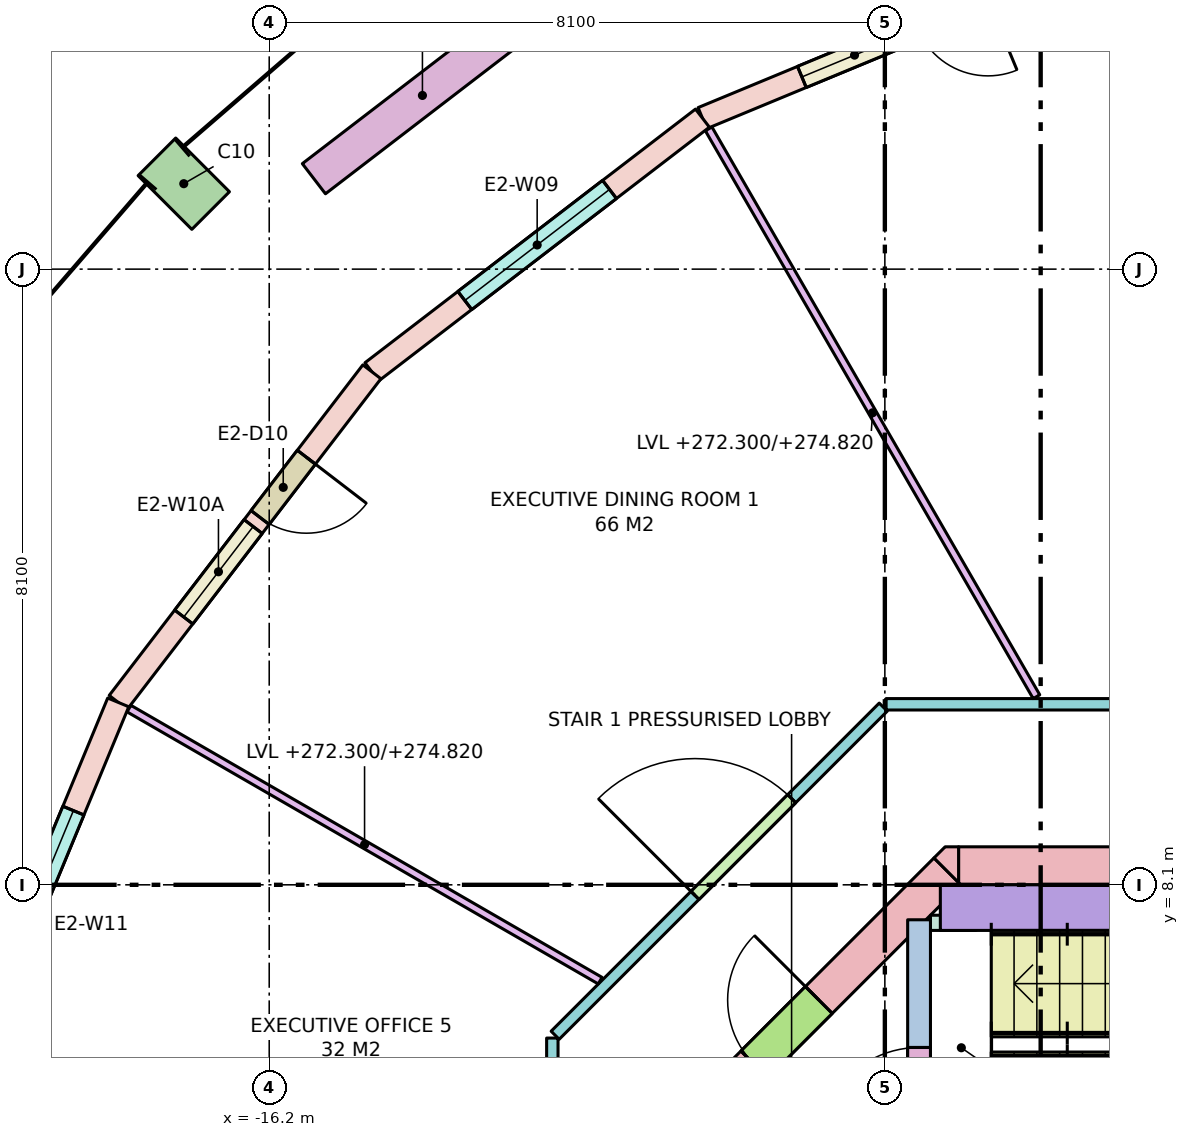
"""IFC4 building model, lengths in metres.
Left out: names, types, materials, properties, quantities, classifications, styles, units other than length and angle.
Written with IfcOpenShell. Run it as: python <this file> out.ifc"""

import sys

from ifc_helpers import new_model, si_unit, direction, frame, frame_2d, origin, origin_2d, place, context, subcontext, project, spatial, polyline, rectangle, outline, extrude, element, fill, save


model = new_model("IFC4")
c1 = context("Model", 3, precision=1e-05, world=origin(), true_north=direction((0.0, 1.0)))
c2 = subcontext(c1, "Body", "Model", "MODEL_VIEW")
j1 = project(units=[si_unit("LENGTHUNIT", "METRE"), si_unit("PLANEANGLEUNIT", "RADIAN")], contexts=[c1])
p1 = place(None, origin())
s1 = spatial("IfcSite", under=j1, at=p1, CompositionType="ELEMENT")
p2 = place(p1, origin())
s2 = spatial("IfcBuilding", under=s1, at=p2, CompositionType="ELEMENT")
p3 = place(p2, frame((0.0, 0.0, 272.3)))
s3 = spatial("IfcBuildingStorey", under=s2, at=p3, CompositionType="ELEMENT", Elevation=272.3)
p4 = place(p3, frame((-17.324, 17.324, 0.0), z_axis=(0.0, 0.0, 1.0), x_axis=(-0.707106781187, -0.707106781187, 0.0)))
e1 = element("IfcColumn", 1, at=p4, inside=s3, PredefinedType="COLUMN", context=c2, shape_type="SweptSolid", body=[
    extrude(rectangle(XDim=0.7, YDim=1.0, at=origin_2d()), origin(), (0.0, 0.0, 1.0), 3.7),
])
p5 = place(p3, frame((-7.13, 8.35, -0.28), z_axis=(0.0, 0.0, 1.0), x_axis=(1.0, 0.0, 0.0)))
e2 = element("IfcWall", 2, at=p5, inside=s3, PredefinedType="SHEAR", context=c2, shape_type="SweptSolid", body=[
    extrude(rectangle(XDim=14.26, YDim=0.5, at=frame_2d((7.13, 0.0))), origin(), (0.0, 0.0, 1.0), 3.7),
])
p6 = place(p5, frame((5.48, 0.0, 0.28)))
e3 = element("IfcOpeningElement", 3, at=p6, cuts=e2, PredefinedType="OPENING", context=c2, shape_type="SweptSolid", body=[
    extrude(rectangle(XDim=0.7, YDim=2.1, at=frame_2d((0.35, 1.05))), frame((0.0, 0.26, 0.0), z_axis=(0.0, -1.0, 0.0), x_axis=(1.0, 0.0, 0.0)), (0.0, 0.0, 1.0), 0.52),
])
p7 = place(p5, frame((7.155, 0.0, 0.28)))
e4 = element("IfcOpeningElement", 4, at=p7, cuts=e2, PredefinedType="OPENING", context=c2, shape_type="SweptSolid", body=[
    extrude(rectangle(XDim=0.9, YDim=2.1, at=frame_2d((0.45, 1.05))), frame((0.0, 0.26, 0.0), z_axis=(0.0, -1.0, 0.0), x_axis=(1.0, 0.0, 0.0)), (0.0, 0.0, 1.0), 0.52),
])
p8 = place(p3, frame((-10.277, 5.277, -0.28), z_axis=(0.0, 0.0, 1.0), x_axis=(0.707106781187, 0.707106781187, 0.0)))
e5 = element("IfcWall", 5, at=p8, inside=s3, PredefinedType="SHEAR", context=c2, shape_type="SweptSolid", body=[
    extrude(rectangle(XDim=4.243, YDim=0.5, at=frame_2d((2.121, 0.0))), origin(), (0.0, 0.0, 1.0), 3.7),
])
p9 = place(p8, frame((0.65, 0.0, 0.28)))
e6 = element("IfcOpeningElement", 6, at=p9, cuts=e5, PredefinedType="OPENING", context=c2, shape_type="SweptSolid", body=[
    extrude(rectangle(XDim=1.2, YDim=2.1, at=frame_2d((0.6, 1.05))), frame((0.0, 0.26, 0.0), z_axis=(0.0, -1.0, 0.0), x_axis=(1.0, 0.0, 0.0)), (0.0, 0.0, 1.0), 0.52),
])
p10 = place(p3, frame((0.0, 0.0, -0.28)))
e7 = element("IfcWall", 7, at=p10, inside=s3, PredefinedType="SHEAR", context=c2, shape_type="SweptSolid", body=[
    extrude(outline(polyline([(-7.307, 8.6), (-7.13, 8.6), (-7.13, 8.13), (-7.454, 8.454), (-7.307, 8.6)])), origin(), (0.0, 0.0, 1.0), 3.7),
])
p11 = place(p3, frame((-7.65, 4.5, 0.0), z_axis=(0.0, 0.0, 1.0), x_axis=(0.0, 1.0, 0.0)))
e8 = element("IfcWall", 8, at=p11, inside=s3, PredefinedType="SHEAR", context=c2, shape_type="SweptSolid", body=[
    extrude(rectangle(XDim=3.14, YDim=0.3, at=frame_2d((1.57, 0.0))), origin(), (0.0, 0.0, 1.0), 3.42),
])
p12 = place(p11, frame((0.14, 0.0, 0.0)))
e9 = element("IfcOpeningElement", 9, at=p12, cuts=e8, PredefinedType="OPENING", context=c2, shape_type="SweptSolid", body=[
    extrude(rectangle(XDim=1.32, YDim=2.1, at=frame_2d((0.66, 1.05))), frame((0.0, 0.16, 0.0), z_axis=(0.0, -1.0, 0.0), x_axis=(1.0, 0.0, 0.0)), (0.0, 0.0, 1.0), 0.32),
])
p13 = place(p3, frame((-7.37, 7.8, 0.0), z_axis=(0.0, 0.0, 1.0), x_axis=(1.0, 0.0, 0.0)))
e10 = element("IfcWall", 10, at=p13, inside=s3, PredefinedType="SHEAR", context=c2, shape_type="SweptSolid", body=[
    extrude(rectangle(XDim=5.37, YDim=0.6, at=frame_2d((2.685, 0.0))), origin(), (0.0, 0.0, 1.0), 3.42),
])
p14 = place(p3, frame((-7.5, 7.6, 0.0), z_axis=(0.0, 0.0, 1.0), x_axis=(1.0, 0.0, 0.0)))
e11 = element("IfcWall", 11, at=p14, inside=s3, PredefinedType="SHEAR", context=c2, shape_type="SweptSolid", body=[
    extrude(rectangle(XDim=0.6, YDim=0.2, at=frame_2d((0.3, 0.0))), origin(), (0.0, 0.0, 1.0), 3.42),
])
p15 = place(p3, frame((-5.435, 20.284, 0.0), z_axis=(0.0, 0.0, 1.0), x_axis=(-0.923877333662, -0.382688740813, 0.0)))
e12 = element("IfcWall", 12, at=p15, inside=s3, PredefinedType="STANDARD", context=c2, shape_type="SweptSolid", body=[
    extrude(rectangle(XDim=5.482, YDim=0.3, at=frame_2d((2.741, 0.0))), origin(), (0.0, 0.0, 1.0), 3.42),
])
p16 = place(p15, frame((1.416, 0.0, 0.0)))
e13 = element("IfcOpeningElement", 13, at=p16, cuts=e12, PredefinedType="OPENING", context=c2, shape_type="SweptSolid", body=[
    extrude(rectangle(XDim=1.0, YDim=2.4, at=frame_2d((0.5, 1.2))), frame((0.0, 0.16, 0.0), z_axis=(0.0, -1.0, 0.0), x_axis=(1.0, 0.0, 0.0)), (0.0, 0.0, 1.0), 0.32),
])
p17 = place(p15, frame((2.566, 0.0, 0.8)))
e14 = element("IfcOpeningElement", 14, at=p17, cuts=e12, PredefinedType="OPENING", context=c2, shape_type="SweptSolid", body=[
    extrude(rectangle(XDim=1.5, YDim=2.4, at=frame_2d((0.75, 1.2))), frame((0.0, 0.16, 0.0), z_axis=(0.0, -1.0, 0.0), x_axis=(1.0, 0.0, 0.0)), (0.0, 0.0, 1.0), 0.32),
])
p18 = place(p3, frame((-10.5, 18.187, 0.0), z_axis=(0.0, 0.0, 1.0), x_axis=(-0.793335336593, -0.608784891166, 0.0)))
e15 = element("IfcWall", 15, at=p18, inside=s3, PredefinedType="STANDARD", context=c2, shape_type="SweptSolid", body=[
    extrude(rectangle(XDim=5.482, YDim=0.3, at=frame_2d((2.741, 0.0))), origin(), (0.0, 0.0, 1.0), 3.42),
])
p19 = place(p18, frame((1.541, 0.0, 0.8)))
e16 = element("IfcOpeningElement", 16, at=p19, cuts=e15, PredefinedType="OPENING", context=c2, shape_type="SweptSolid", body=[
    extrude(rectangle(XDim=2.4, YDim=2.4, at=frame_2d((1.2, 1.2))), frame((0.0, 0.16, 0.0), z_axis=(0.0, -1.0, 0.0), x_axis=(1.0, 0.0, 0.0)), (0.0, 0.0, 1.0), 0.32),
])
p20 = place(p3, frame((-14.849, 14.849, 0.0), z_axis=(0.0, 0.0, 1.0), x_axis=(-0.608784891166, -0.793335336593, 0.0)))
e17 = element("IfcWall", 17, at=p20, inside=s3, PredefinedType="STANDARD", context=c2, shape_type="SweptSolid", body=[
    extrude(rectangle(XDim=5.482, YDim=0.3, at=frame_2d((2.741, 0.0))), origin(), (0.0, 0.0, 1.0), 3.42),
])
p21 = place(p20, frame((1.416, 0.0, 0.0)))
e18 = element("IfcOpeningElement", 18, at=p21, cuts=e17, PredefinedType="OPENING", context=c2, shape_type="SweptSolid", body=[
    extrude(rectangle(XDim=1.0, YDim=2.4, at=frame_2d((0.5, 1.2))), frame((0.0, 0.16, 0.0), z_axis=(0.0, -1.0, 0.0), x_axis=(1.0, 0.0, 0.0)), (0.0, 0.0, 1.0), 0.32),
])
p22 = place(p20, frame((2.566, 0.0, 0.8)))
e19 = element("IfcOpeningElement", 19, at=p22, cuts=e17, PredefinedType="OPENING", context=c2, shape_type="SweptSolid", body=[
    extrude(rectangle(XDim=1.5, YDim=2.4, at=frame_2d((0.75, 1.2))), frame((0.0, 0.16, 0.0), z_axis=(0.0, -1.0, 0.0), x_axis=(1.0, 0.0, 0.0)), (0.0, 0.0, 1.0), 0.32),
])
p23 = place(p3, frame((-18.187, 10.5, 0.0), z_axis=(0.0, 0.0, 1.0), x_axis=(-0.382688740813, -0.923877333662, 0.0)))
e20 = element("IfcWall", 20, at=p23, inside=s3, PredefinedType="STANDARD", context=c2, shape_type="SweptSolid", body=[
    extrude(rectangle(XDim=5.482, YDim=0.3, at=frame_2d((2.741, 0.0))), origin(), (0.0, 0.0, 1.0), 3.42),
])
p24 = place(p23, frame((1.541, 0.0, 0.8)))
e21 = element("IfcOpeningElement", 21, at=p24, cuts=e20, PredefinedType="OPENING", context=c2, shape_type="SweptSolid", body=[
    extrude(rectangle(XDim=2.4, YDim=2.4, at=frame_2d((1.2, 1.2))), frame((0.0, 0.16, 0.0), z_axis=(0.0, -1.0, 0.0), x_axis=(1.0, 0.0, 0.0)), (0.0, 0.0, 1.0), 0.32),
])
p25 = place(p3, frame((-12.756, 19.581, 0.0), z_axis=(0.0, 0.0, 1.0), x_axis=(-0.793384730612, -0.608720518162, 0.0)))
e22 = element("IfcWall", 22, at=p25, inside=s3, PredefinedType="PARAPET", context=c2, shape_type="SweptSolid", body=[
    extrude(rectangle(XDim=3.6, YDim=0.5, at=frame_2d((1.8, 0.0))), origin(), (0.0, 0.0, 1.0), 0.9),
])
p26 = place(p3, frame((-12.475, -6.084, 0.0), z_axis=(0.0, 0.0, 1.0), x_axis=(0.0, 1.0, 0.0)))
e23 = element("IfcWall", 23, at=p26, inside=s3, PredefinedType="PARTITIONING", context=c2, shape_type="SweptSolid", body=[
    extrude(rectangle(XDim=12.167, YDim=0.15, at=frame_2d((6.084, 0.0))), origin(), (0.0, 0.0, 1.0), 2.52),
])
p27 = place(p26, frame((10.272, 0.0, 0.0)))
e24 = element("IfcOpeningElement", 24, at=p27, cuts=e23, PredefinedType="OPENING", context=c2, shape_type="SweptSolid", body=[
    extrude(rectangle(XDim=1.0, YDim=2.1, at=frame_2d((0.5, 1.05))), frame((0.0, 0.085, 0.0), z_axis=(0.0, -1.0, 0.0), x_axis=(1.0, 0.0, 0.0)), (0.0, 0.0, 1.0), 0.17),
])
p28 = place(p26, frame((7.306, 0.0, 0.0)))
e25 = element("IfcOpeningElement", 25, at=p28, cuts=e23, PredefinedType="OPENING", context=c2, shape_type="SweptSolid", body=[
    extrude(rectangle(XDim=0.9, YDim=2.1, at=frame_2d((0.45, 1.05))), frame((0.0, 0.085, 0.0), z_axis=(0.0, -1.0, 0.0), x_axis=(1.0, 0.0, 0.0)), (0.0, 0.0, 1.0), 0.17),
])
p29 = place(p26, frame((3.961, 0.0, 0.0)))
e26 = element("IfcOpeningElement", 26, at=p29, cuts=e23, PredefinedType="OPENING", context=c2, shape_type="SweptSolid", body=[
    extrude(rectangle(XDim=0.9, YDim=2.1, at=frame_2d((0.45, 1.05))), frame((0.0, 0.085, 0.0), z_axis=(0.0, -1.0, 0.0), x_axis=(1.0, 0.0, 0.0)), (0.0, 0.0, 1.0), 0.17),
])
p30 = place(p26, frame((0.896, 0.0, 0.0)))
e27 = element("IfcOpeningElement", 27, at=p30, cuts=e23, PredefinedType="OPENING", context=c2, shape_type="SweptSolid", body=[
    extrude(rectangle(XDim=1.0, YDim=2.1, at=frame_2d((0.5, 1.05))), frame((0.0, 0.085, 0.0), z_axis=(0.0, -1.0, 0.0), x_axis=(1.0, 0.0, 0.0)), (0.0, 0.0, 1.0), 0.17),
])
p31 = place(p3, frame((-12.438, 6.121, 0.0), z_axis=(0.0, 0.0, 1.0), x_axis=(0.707106781187, 0.707106781187, 0.0)))
e28 = element("IfcWall", 28, at=p31, inside=s3, PredefinedType="PARTITIONING", context=c2, shape_type="SweptSolid", body=[
    extrude(rectangle(XDim=6.105, YDim=0.15, at=frame_2d((3.053, 0.0))), origin(), (0.0, 0.0, 1.0), 2.52),
])
p32 = place(p31, frame((2.602, 0.0, 0.0)))
e29 = element("IfcOpeningElement", 29, at=p32, cuts=e28, PredefinedType="OPENING", context=c2, shape_type="SweptSolid", body=[
    extrude(rectangle(XDim=1.8, YDim=2.1, at=frame_2d((0.9, 1.05))), frame((0.0, 0.085, 0.0), z_axis=(0.0, -1.0, 0.0), x_axis=(1.0, 0.0, 0.0)), (0.0, 0.0, 1.0), 0.17),
])
p33 = place(p3, frame((-8.084, 10.475, 0.0), z_axis=(0.0, 0.0, 1.0), x_axis=(1.0, 0.0, 0.0)))
e30 = element("IfcWall", 30, at=p33, inside=s3, PredefinedType="PARTITIONING", context=c2, shape_type="SweptSolid", body=[
    extrude(rectangle(XDim=16.167, YDim=0.15, at=frame_2d((8.084, 0.0))), origin(), (0.0, 0.0, 1.0), 2.52),
])
p34 = place(p33, frame((13.004, 0.0, 0.0)))
e31 = element("IfcOpeningElement", 31, at=p34, cuts=e30, PredefinedType="OPENING", context=c2, shape_type="SweptSolid", body=[
    extrude(rectangle(XDim=1.0, YDim=2.1, at=frame_2d((0.5, 1.05))), frame((0.0, 0.085, 0.0), z_axis=(0.0, -1.0, 0.0), x_axis=(1.0, 0.0, 0.0)), (0.0, 0.0, 1.0), 0.17),
])
p35 = place(p33, frame((9.038, 0.0, 0.0)))
e32 = element("IfcOpeningElement", 32, at=p35, cuts=e30, PredefinedType="OPENING", context=c2, shape_type="SweptSolid", body=[
    extrude(rectangle(XDim=0.9, YDim=2.1, at=frame_2d((0.45, 1.05))), frame((0.0, 0.085, 0.0), z_axis=(0.0, -1.0, 0.0), x_axis=(1.0, 0.0, 0.0)), (0.0, 0.0, 1.0), 0.17),
])
p36 = place(p33, frame((4.556, 0.0, 0.0)))
e33 = element("IfcOpeningElement", 33, at=p36, cuts=e30, PredefinedType="OPENING", context=c2, shape_type="SweptSolid", body=[
    extrude(rectangle(XDim=1.0, YDim=2.1, at=frame_2d((0.5, 1.05))), frame((0.0, 0.085, 0.0), z_axis=(0.0, -1.0, 0.0), x_axis=(1.0, 0.0, 0.0)), (0.0, 0.0, 1.0), 0.17),
])
p37 = place(p3, frame((-6.105, 10.575, 0.0), z_axis=(0.0, 0.0, 1.0), x_axis=(-0.50001399067, 0.866017326117, 0.0)))
e34 = element("IfcWall", 34, at=p37, inside=s3, PredefinedType="PARTITIONING", context=c2, shape_type="SweptSolid", body=[
    extrude(rectangle(XDim=8.626, YDim=0.1, at=frame_2d((4.313, 0.0))), origin(), (0.0, 0.0, 1.0), 2.52),
])
p38 = place(p3, frame((-11.846, 6.839, 0.0), z_axis=(0.0, 0.0, 1.0), x_axis=(-0.866011787705, 0.500023583, 0.0)))
e35 = element("IfcWall", 35, at=p38, inside=s3, PredefinedType="PARTITIONING", context=c2, shape_type="SweptSolid", body=[
    extrude(rectangle(XDim=7.158, YDim=0.1, at=frame_2d((3.579, 0.0))), origin(), (0.0, 0.0, 1.0), 2.52),
])
p39 = place(p17, origin())
e36 = element("IfcWindow", 36, at=p39, inside=s3, PartitioningType="SINGLE_PANEL", PredefinedType="WINDOW", context=c2, shape_type="SweptSolid", body=[
    extrude(rectangle(XDim=1.5, YDim=2.4, at=frame_2d((0.75, 1.2))), frame((0.0, 0.03, 0.0), z_axis=(0.0, -1.0, 0.0), x_axis=(1.0, 0.0, 0.0)), (0.0, 0.0, 1.0), 0.06),
])
fill(e14, e36)
p40 = place(p19, origin())
e37 = element("IfcWindow", 37, at=p40, inside=s3, PartitioningType="SINGLE_PANEL", PredefinedType="WINDOW", context=c2, shape_type="SweptSolid", body=[
    extrude(rectangle(XDim=2.4, YDim=2.4, at=frame_2d((1.2, 1.2))), frame((0.0, 0.03, 0.0), z_axis=(0.0, -1.0, 0.0), x_axis=(1.0, 0.0, 0.0)), (0.0, 0.0, 1.0), 0.06),
])
fill(e16, e37)
p41 = place(p21, origin())
e38 = element("IfcDoor", 38, at=p41, inside=s3, OperationType="SINGLE_SWING_LEFT", PredefinedType="DOOR", context=c2, shape_type="SweptSolid", body=[
    extrude(rectangle(XDim=1.0, YDim=2.4, at=frame_2d((0.5, 1.2))), frame((0.0, 0.025, 0.0), z_axis=(0.0, -1.0, 0.0), x_axis=(1.0, 0.0, 0.0)), (0.0, 0.0, 1.0), 0.05),
])
fill(e18, e38)
p42 = place(p22, origin())
e39 = element("IfcWindow", 39, at=p42, inside=s3, PartitioningType="SINGLE_PANEL", PredefinedType="WINDOW", context=c2, shape_type="SweptSolid", body=[
    extrude(rectangle(XDim=1.5, YDim=2.4, at=frame_2d((0.75, 1.2))), frame((0.0, 0.03, 0.0), z_axis=(0.0, -1.0, 0.0), x_axis=(1.0, 0.0, 0.0)), (0.0, 0.0, 1.0), 0.06),
])
fill(e19, e39)
p43 = place(p24, origin())
e40 = element("IfcWindow", 40, at=p43, inside=s3, PartitioningType="SINGLE_PANEL", PredefinedType="WINDOW", context=c2, shape_type="SweptSolid", body=[
    extrude(rectangle(XDim=2.4, YDim=2.4, at=frame_2d((1.2, 1.2))), frame((0.0, 0.03, 0.0), z_axis=(0.0, -1.0, 0.0), x_axis=(1.0, 0.0, 0.0)), (0.0, 0.0, 1.0), 0.06),
])
fill(e21, e40)
p44 = place(p12, origin())
e41 = element("IfcDoor", 41, at=p44, inside=s3, OperationType="DOUBLE_DOOR_SINGLE_SWING", PredefinedType="DOOR", context=c2, shape_type="SweptSolid", body=[
    extrude(rectangle(XDim=1.32, YDim=2.1, at=frame_2d((0.66, 1.05))), frame((0.0, 0.025, 0.0), z_axis=(0.0, -1.0, 0.0), x_axis=(1.0, 0.0, 0.0)), (0.0, 0.0, 1.0), 0.05),
])
fill(e9, e41)
p45 = place(p9, origin())
e42 = element("IfcDoor", 42, at=p45, inside=s3, OperationType="SINGLE_SWING_RIGHT", PredefinedType="DOOR", context=c2, shape_type="SweptSolid", body=[
    extrude(rectangle(XDim=1.2, YDim=2.1, at=frame_2d((0.6, 1.05))), frame((0.0, 0.025, 0.0), z_axis=(0.0, -1.0, 0.0), x_axis=(1.0, 0.0, 0.0)), (0.0, 0.0, 1.0), 0.05),
])
fill(e6, e42)
p46 = place(p32, origin())
e43 = element("IfcDoor", 43, at=p46, inside=s3, OperationType="DOUBLE_DOOR_SINGLE_SWING", PredefinedType="DOOR", context=c2, shape_type="SweptSolid", body=[
    extrude(rectangle(XDim=1.8, YDim=2.1, at=frame_2d((0.9, 1.05))), frame((0.0, 0.025, 0.0), z_axis=(0.0, -1.0, 0.0), x_axis=(1.0, 0.0, 0.0)), (0.0, 0.0, 1.0), 0.05),
])
fill(e29, e43)
save(model, sys.argv[1])
